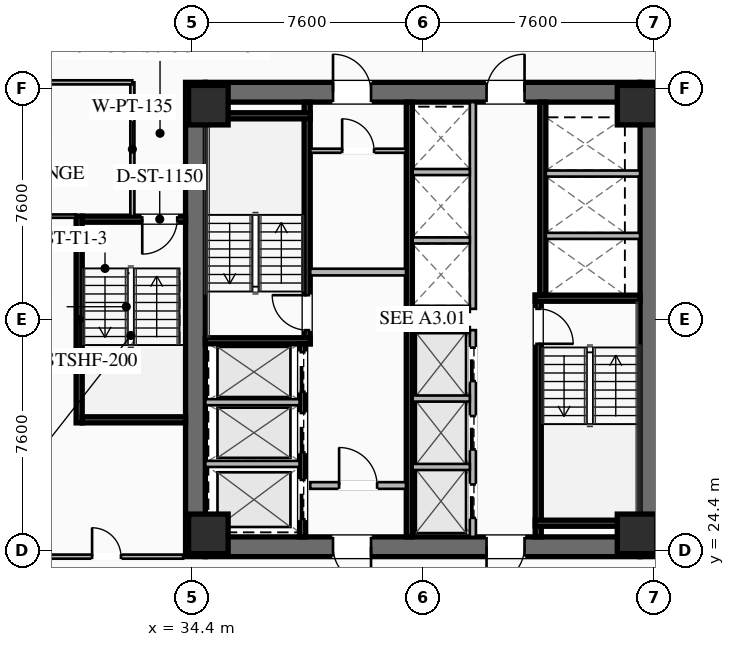
"""IFC4 building model, lengths in metres.
Left out: names, types, materials, properties, quantities, classifications, styles, units other than length and angle.
Written with IfcOpenShell. Run it as: python <this file> out.ifc"""

import sys

from ifc_helpers import new_model, si_unit, direction, frame, frame_2d, origin, origin_2d, place, context, subcontext, project, spatial, rectangle, hollow_rectangle, extrude, element, fill, save


model = new_model("IFC4")
c1 = context("Model", 3, precision=1e-05, world=origin(), true_north=direction((0.0, 1.0)))
c2 = subcontext(c1, "Body", "Model", "MODEL_VIEW")
j1 = project(units=[si_unit("LENGTHUNIT", "METRE"), si_unit("PLANEANGLEUNIT", "RADIAN")], contexts=[c1])
p1 = place(None, origin())
s1 = spatial("IfcSite", under=j1, at=p1, CompositionType="ELEMENT")
p2 = place(p1, origin())
s2 = spatial("IfcBuilding", under=s1, at=p2, CompositionType="ELEMENT")
p3 = place(p2, frame((0.0, 0.0, 92.05)))
s3 = spatial("IfcBuildingStorey", under=s2, at=p3, CompositionType="ELEMENT", Elevation=92.05)
for number, where, z_axis, x_axis in (
    (1, (34.525, 24.2, 0.0), (0.0, 0.0, 1.0), (0.0, 1.0, 0.0)),
    (2, (49.475, 39.8, 0.0), (0.0, 0.0, 1.0), (0.0, -1.0, 0.0)),
):
    element("IfcWall", number, at=place(p3, frame(where, z_axis=z_axis, x_axis=x_axis)), inside=s3, PredefinedType="SHEAR", context=c2, shape_type="SweptSolid", body=[
        extrude(rectangle(XDim=15.6, YDim=0.65, at=frame_2d((7.8, 0.0))), origin(), (0.0, 0.0, 1.0), 3.55),
    ])
p4 = place(p3, frame((49.15, 24.525, 0.0), z_axis=(0.0, 0.0, 1.0), x_axis=(-1.0, 0.0, 0.0)))
e3 = element("IfcWall", 3, at=p4, inside=s3, PredefinedType="SHEAR", context=c2, shape_type="SweptSolid", body=[
    extrude(rectangle(XDim=14.3, YDim=0.65, at=frame_2d((7.15, 0.0))), origin(), (0.0, 0.0, 1.0), 3.55),
])
p5 = place(p4, frame((8.85, 0.0, 0.0)))
e4 = element("IfcOpeningElement", 4, at=p5, cuts=e3, PredefinedType="OPENING", context=c2, shape_type="SweptSolid", body=[
    extrude(rectangle(XDim=1.25, YDim=2.25, at=frame_2d((0.625, 1.125))), frame((0.0, 0.335, 0.0), z_axis=(0.0, -1.0, 0.0), x_axis=(1.0, 0.0, 0.0)), (0.0, 0.0, 1.0), 0.67),
])
p6 = place(p4, frame((3.8, 0.0, 0.0)))
e5 = element("IfcOpeningElement", 5, at=p6, cuts=e3, PredefinedType="OPENING", context=c2, shape_type="SweptSolid", body=[
    extrude(rectangle(XDim=1.25, YDim=2.25, at=frame_2d((0.625, 1.125))), frame((0.0, 0.335, 0.0), z_axis=(0.0, -1.0, 0.0), x_axis=(1.0, 0.0, 0.0)), (0.0, 0.0, 1.0), 0.67),
])
p7 = place(p3, frame((34.85, 39.475, 0.0), z_axis=(0.0, 0.0, 1.0), x_axis=(1.0, 0.0, 0.0)))
e6 = element("IfcWall", 6, at=p7, inside=s3, PredefinedType="SHEAR", context=c2, shape_type="SweptSolid", body=[
    extrude(rectangle(XDim=14.3, YDim=0.65, at=frame_2d((7.15, 0.0))), origin(), (0.0, 0.0, 1.0), 3.55),
])
p8 = place(p7, frame((4.2, 0.0, 0.0)))
e7 = element("IfcOpeningElement", 7, at=p8, cuts=e6, PredefinedType="OPENING", context=c2, shape_type="SweptSolid", body=[
    extrude(rectangle(XDim=1.25, YDim=2.25, at=frame_2d((0.625, 1.125))), frame((0.0, 0.335, 0.0), z_axis=(0.0, -1.0, 0.0), x_axis=(1.0, 0.0, 0.0)), (0.0, 0.0, 1.0), 0.67),
])
p9 = place(p7, frame((9.25, 0.0, 0.0)))
e8 = element("IfcOpeningElement", 8, at=p9, cuts=e6, PredefinedType="OPENING", context=c2, shape_type="SweptSolid", body=[
    extrude(rectangle(XDim=1.25, YDim=2.25, at=frame_2d((0.625, 1.125))), frame((0.0, 0.335, 0.0), z_axis=(0.0, -1.0, 0.0), x_axis=(1.0, 0.0, 0.0)), (0.0, 0.0, 1.0), 0.67),
])
for number, where, z_axis, x_axis in (
    (9, (34.95, 24.95, 0.0), (0.0, 0.0, 1.0), (1.0, 0.0, 0.0)),
    (10, (49.05, 24.95, 0.0), (0.0, 0.0, 1.0), (1.0, 0.0, 0.0)),
    (11, (49.05, 39.05, 0.0), (0.0, 0.0, 1.0), (1.0, 0.0, 0.0)),
    (12, (34.95, 39.05, 0.0), (0.0, 0.0, 1.0), (1.0, 0.0, 0.0)),
):
    element("IfcColumn", number, at=place(p3, frame(where, z_axis=z_axis, x_axis=x_axis)), inside=s3, PredefinedType="COLUMN", context=c2, shape_type="SweptSolid", body=[
        extrude(hollow_rectangle(XDim=1.3, YDim=1.3, WallThickness=0.05, at=origin_2d()), origin(), (0.0, 0.0, 1.0), 3.35),
    ])
p10 = place(p3, frame((38.2, 31.2, 0.0), z_axis=(0.0, 0.0, 1.0), x_axis=(0.0, 1.0, 0.0)))
e13 = element("IfcWall", 13, at=p10, inside=s3, PredefinedType="SHEAR", context=c2, shape_type="SweptSolid", body=[
    extrude(rectangle(XDim=7.95, YDim=0.2, at=frame_2d((3.975, 0.0))), origin(), (0.0, 0.0, 1.0), 3.35),
])
p11 = place(p10, frame((0.45, 0.0, 0.0)))
e14 = element("IfcOpeningElement", 14, at=p11, cuts=e13, PredefinedType="OPENING", context=c2, shape_type="SweptSolid", body=[
    extrude(rectangle(XDim=1.15, YDim=2.2, at=frame_2d((0.575, 1.1))), frame((0.0, 0.11, 0.0), z_axis=(0.0, -1.0, 0.0), x_axis=(1.0, 0.0, 0.0)), (0.0, 0.0, 1.0), 0.22),
])
for number, where, z_axis, x_axis in (
    (15, (34.85, 31.3, 0.0), (0.0, 0.0, 1.0), (1.0, 0.0, 0.0)),
    (16, (34.85, 38.7, 0.0), (0.0, 0.0, 1.0), (1.0, 0.0, 0.0)),
):
    element("IfcWall", number, at=place(p3, frame(where, z_axis=z_axis, x_axis=x_axis)), inside=s3, PredefinedType="SHEAR", context=c2, shape_type="SweptSolid", body=[
        extrude(rectangle(XDim=3.45, YDim=0.2, at=frame_2d((1.725, 0.0))), origin(), (0.0, 0.0, 1.0), 3.35),
    ])
p12 = place(p3, frame((45.8, 32.8, 0.0), z_axis=(0.0, 0.0, 1.0), x_axis=(0.0, -1.0, 0.0)))
e17 = element("IfcWall", 17, at=p12, inside=s3, PredefinedType="SHEAR", context=c2, shape_type="SweptSolid", body=[
    extrude(rectangle(XDim=7.95, YDim=0.2, at=frame_2d((3.975, 0.0))), origin(), (0.0, 0.0, 1.0), 3.35),
])
p13 = place(p12, frame((0.45, 0.0, 0.0)))
e18 = element("IfcOpeningElement", 18, at=p13, cuts=e17, PredefinedType="OPENING", context=c2, shape_type="SweptSolid", body=[
    extrude(rectangle(XDim=1.15, YDim=2.2, at=frame_2d((0.575, 1.1))), frame((0.0, 0.11, 0.0), z_axis=(0.0, -1.0, 0.0), x_axis=(1.0, 0.0, 0.0)), (0.0, 0.0, 1.0), 0.22),
])
for number, where, z_axis, x_axis in (
    (19, (45.7, 32.7, 0.0), (0.0, 0.0, 1.0), (1.0, 0.0, 0.0)),
    (20, (45.7, 25.3, 0.0), (0.0, 0.0, 1.0), (1.0, 0.0, 0.0)),
):
    element("IfcWall", number, at=place(p3, frame(where, z_axis=z_axis, x_axis=x_axis)), inside=s3, PredefinedType="SHEAR", context=c2, shape_type="SweptSolid", body=[
        extrude(rectangle(XDim=3.45, YDim=0.2, at=frame_2d((1.725, 0.0))), origin(), (0.0, 0.0, 1.0), 3.35),
    ])
p14 = place(p3, frame((41.56, 24.85, 0.0), z_axis=(0.0, 0.0, 1.0), x_axis=(0.0, 1.0, 0.0)))
e21 = element("IfcWall", 21, at=p14, inside=s3, PredefinedType="SHEAR", context=c2, shape_type="SweptSolid", body=[
    extrude(rectangle(XDim=14.3, YDim=0.2, at=frame_2d((7.15, 0.0))), origin(), (0.0, 0.0, 1.0), 3.35),
])
p15 = place(p3, frame((38.3, 33.56, 0.0), z_axis=(0.0, 0.0, 1.0), x_axis=(1.0, 0.0, 0.0)))
e22 = element("IfcWall", 22, at=p15, inside=s3, PredefinedType="SOLIDWALL", context=c2, shape_type="SweptSolid", body=[
    extrude(rectangle(XDim=3.15, YDim=0.22, at=frame_2d((1.575, 0.0))), origin(), (0.0, 0.0, 1.0), 2.703),
])
p16 = place(p3, frame((38.3, 26.54, 0.0), z_axis=(0.0, 0.0, 1.0), x_axis=(1.0, 0.0, 0.0)))
e23 = element("IfcWall", 23, at=p16, inside=s3, PredefinedType="SOLIDWALL", context=c2, shape_type="SweptSolid", body=[
    extrude(rectangle(XDim=3.15, YDim=0.22, at=frame_2d((1.575, 0.0))), origin(), (0.0, 0.0, 1.0), 2.703),
])
p17 = place(p16, frame((0.95, 0.0, 0.0)))
e24 = element("IfcOpeningElement", 24, at=p17, cuts=e23, PredefinedType="OPENING", context=c2, shape_type="SweptSolid", body=[
    extrude(rectangle(XDim=1.25, YDim=2.25, at=frame_2d((0.625, 1.125))), frame((0.0, 0.12, 0.0), z_axis=(0.0, -1.0, 0.0), x_axis=(1.0, 0.0, 0.0)), (0.0, 0.0, 1.0), 0.24),
])
p18 = place(p3, frame((38.05, 24.85, 0.0), z_axis=(0.0, 0.0, 1.0), x_axis=(0.0, 1.0, 0.0)))
e25 = element("IfcWall", 25, at=p18, inside=s3, PredefinedType="SHEAR", context=c2, shape_type="SweptSolid", body=[
    extrude(rectangle(XDim=6.35, YDim=0.2, at=frame_2d((3.175, 0.0))), origin(), (0.0, 0.0, 1.0), 3.35),
])
p19 = place(p18, frame((4.775, 0.0, 0.0)))
e26 = element("IfcOpeningElement", 26, at=p19, cuts=e25, PredefinedType="OPENING", context=c2, shape_type="SweptSolid", body=[
    extrude(rectangle(XDim=1.3, YDim=2.25, at=frame_2d((0.65, 1.125))), frame((0.0, 0.11, 0.0), z_axis=(0.0, -1.0, 0.0), x_axis=(1.0, 0.0, 0.0)), (0.0, 0.0, 1.0), 0.22),
])
p20 = place(p18, frame((2.775, 0.0, 0.0)))
e27 = element("IfcOpeningElement", 27, at=p20, cuts=e25, PredefinedType="OPENING", context=c2, shape_type="SweptSolid", body=[
    extrude(rectangle(XDim=1.3, YDim=2.25, at=frame_2d((0.65, 1.125))), frame((0.0, 0.11, 0.0), z_axis=(0.0, -1.0, 0.0), x_axis=(1.0, 0.0, 0.0)), (0.0, 0.0, 1.0), 0.22),
])
p21 = place(p18, frame((0.575, 0.0, 0.0)))
e28 = element("IfcOpeningElement", 28, at=p21, cuts=e25, PredefinedType="OPENING", context=c2, shape_type="SweptSolid", body=[
    extrude(rectangle(XDim=1.3, YDim=2.25, at=frame_2d((0.65, 1.125))), frame((0.0, 0.11, 0.0), z_axis=(0.0, -1.0, 0.0), x_axis=(1.0, 0.0, 0.0)), (0.0, 0.0, 1.0), 0.22),
])
for number, where, z_axis, x_axis in (
    (29, (34.85, 27.25, 0.0), (0.0, 0.0, 1.0), (1.0, 0.0, 0.0)),
    (30, (34.85, 29.28, 0.0), (0.0, 0.0, 1.0), (1.0, 0.0, 0.0)),
):
    element("IfcWall", number, at=place(p3, frame(where, z_axis=z_axis, x_axis=x_axis)), inside=s3, PredefinedType="SOLIDWALL", context=c2, shape_type="SweptSolid", body=[
        extrude(rectangle(XDim=3.1, YDim=0.2, at=frame_2d((1.55, 0.0))), origin(), (0.0, 0.0, 1.0), 3.35),
    ])
p22 = place(p3, frame((45.95, 39.15, 0.0), z_axis=(0.0, 0.0, 1.0), x_axis=(0.0, -1.0, 0.0)))
e31 = element("IfcWall", 31, at=p22, inside=s3, PredefinedType="SHEAR", context=c2, shape_type="SweptSolid", body=[
    extrude(rectangle(XDim=6.35, YDim=0.2, at=frame_2d((3.175, 0.0))), origin(), (0.0, 0.0, 1.0), 3.35),
])
for number, where, z_axis, x_axis in (
    (32, (46.05, 34.75, 0.0), (0.0, 0.0, 1.0), (1.0, 0.0, 0.0)),
    (33, (46.05, 36.8, 0.0), (0.0, 0.0, 1.0), (1.0, 0.0, 0.0)),
):
    element("IfcWall", number, at=place(p3, frame(where, z_axis=z_axis, x_axis=x_axis)), inside=s3, PredefinedType="SOLIDWALL", context=c2, shape_type="SweptSolid", body=[
        extrude(rectangle(XDim=3.1, YDim=0.2, at=frame_2d((1.55, 0.0))), origin(), (0.0, 0.0, 1.0), 3.35),
    ])
p23 = place(p3, frame((38.3, 37.55, 0.0), z_axis=(0.0, 0.0, 1.0), x_axis=(1.0, 0.0, 0.0)))
e34 = element("IfcWall", 34, at=p23, inside=s3, PredefinedType="PARTITIONING", context=c2, shape_type="SweptSolid", body=[
    extrude(rectangle(XDim=3.15, YDim=0.135, at=frame_2d((1.575, 0.0))), origin(), (0.0, 0.0, 1.0), 2.703),
])
p24 = place(p23, frame((1.05, 0.0, 0.0)))
e35 = element("IfcOpeningElement", 35, at=p24, cuts=e34, PredefinedType="OPENING", context=c2, shape_type="SweptSolid", body=[
    extrude(rectangle(XDim=1.05, YDim=2.2, at=frame_2d((0.525, 1.1))), frame((0.0, 0.077, 0.0), z_axis=(0.0, -1.0, 0.0), x_axis=(1.0, 0.0, 0.0)), (0.0, 0.0, 1.0), 0.155),
])
p25 = place(p3, frame((43.65, 24.85, 0.0), z_axis=(0.0, 0.0, 1.0), x_axis=(0.0, 1.0, 0.0)))
e36 = element("IfcWall", 36, at=p25, inside=s3, PredefinedType="SOLIDWALL", context=c2, shape_type="SweptSolid", body=[
    extrude(rectangle(XDim=6.8, YDim=0.2, at=frame_2d((3.4, 0.0))), origin(), (0.0, 0.0, 1.0), 3.35),
])
p26 = place(p25, frame((0.625, 0.0, 0.0)))
e37 = element("IfcOpeningElement", 37, at=p26, cuts=e36, PredefinedType="OPENING", context=c2, shape_type="SweptSolid", body=[
    extrude(rectangle(XDim=1.1, YDim=2.2, at=frame_2d((0.55, 1.1))), frame((0.0, 0.11, 0.0), z_axis=(0.0, -1.0, 0.0), x_axis=(1.0, 0.0, 0.0)), (0.0, 0.0, 1.0), 0.22),
])
p27 = place(p25, frame((2.875, 0.0, 0.0)))
e38 = element("IfcOpeningElement", 38, at=p27, cuts=e36, PredefinedType="OPENING", context=c2, shape_type="SweptSolid", body=[
    extrude(rectangle(XDim=1.1, YDim=2.2, at=frame_2d((0.55, 1.1))), frame((0.0, 0.11, 0.0), z_axis=(0.0, -1.0, 0.0), x_axis=(1.0, 0.0, 0.0)), (0.0, 0.0, 1.0), 0.22),
])
p28 = place(p25, frame((5.125, 0.0, 0.0)))
e39 = element("IfcOpeningElement", 39, at=p28, cuts=e36, PredefinedType="OPENING", context=c2, shape_type="SweptSolid", body=[
    extrude(rectangle(XDim=1.1, YDim=2.2, at=frame_2d((0.55, 1.1))), frame((0.0, 0.11, 0.0), z_axis=(0.0, -1.0, 0.0), x_axis=(1.0, 0.0, 0.0)), (0.0, 0.0, 1.0), 0.22),
])
for number, where, z_axis, x_axis in (
    (40, (41.67, 27.15, 0.0), (0.0, 0.0, 1.0), (1.0, 0.0, 0.0)),
    (41, (41.67, 29.4, 0.0), (0.0, 0.0, 1.0), (1.0, 0.0, 0.0)),
    (42, (41.67, 31.65, 0.0), (0.0, 0.0, 1.0), (1.0, 0.0, 0.0)),
):
    element("IfcWall", number, at=place(p3, frame(where, z_axis=z_axis, x_axis=x_axis)), inside=s3, PredefinedType="SOLIDWALL", context=c2, shape_type="SweptSolid", body=[
        extrude(rectangle(XDim=1.88, YDim=0.2, at=frame_2d((0.94, 0.0))), origin(), (0.0, 0.0, 1.0), 3.35),
    ])
p29 = place(p3, frame((43.65, 32.35, 0.0), z_axis=(0.0, 0.0, 1.0), x_axis=(0.0, 1.0, 0.0)))
e43 = element("IfcWall", 43, at=p29, inside=s3, PredefinedType="SOLIDWALL", context=c2, shape_type="SweptSolid", body=[
    extrude(rectangle(XDim=6.8, YDim=0.2, at=frame_2d((3.4, 0.0))), origin(), (0.0, 0.0, 1.0), 3.35),
])
for number, where, z_axis, x_axis in (
    (44, (41.67, 32.35, 0.0), (0.0, 0.0, 1.0), (1.0, 0.0, 0.0)),
    (45, (41.67, 34.6, 0.0), (0.0, 0.0, 1.0), (1.0, 0.0, 0.0)),
    (46, (41.67, 36.85, 0.0), (0.0, 0.0, 1.0), (1.0, 0.0, 0.0)),
):
    element("IfcWall", number, at=place(p3, frame(where, z_axis=z_axis, x_axis=x_axis)), inside=s3, PredefinedType="SOLIDWALL", context=c2, shape_type="SweptSolid", body=[
        extrude(rectangle(XDim=1.88, YDim=0.2, at=frame_2d((0.94, 0.0))), origin(), (0.0, 0.0, 1.0), 3.35),
    ])
p30 = place(p3, frame((30.7, 28.6, 0.0), z_axis=(0.0, 0.0, 1.0), x_axis=(0.0, 1.0, 0.0)))
e47 = element("IfcWall", 47, at=p30, inside=s3, PredefinedType="SHEAR", context=c2, shape_type="SweptSolid", body=[
    extrude(rectangle(XDim=6.8, YDim=0.2, at=frame_2d((3.4, 0.0))), origin(), (0.0, 0.0, 1.0), 3.35),
])
p31 = place(p3, frame((34.2, 35.3, 0.0), z_axis=(0.0, 0.0, 1.0), x_axis=(-1.0, 0.0, 0.0)))
e48 = element("IfcWall", 48, at=p31, inside=s3, PredefinedType="SHEAR", context=c2, shape_type="SweptSolid", body=[
    extrude(rectangle(XDim=3.4, YDim=0.2, at=frame_2d((1.7, 0.0))), origin(), (0.0, 0.0, 1.0), 3.35),
])
p32 = place(p31, frame((0.275, 0.0, 0.0)))
e49 = element("IfcOpeningElement", 49, at=p32, cuts=e48, PredefinedType="OPENING", context=c2, shape_type="SweptSolid", body=[
    extrude(rectangle(XDim=1.15, YDim=2.2, at=frame_2d((0.575, 1.1))), frame((0.0, 0.11, 0.0), z_axis=(0.0, -1.0, 0.0), x_axis=(1.0, 0.0, 0.0)), (0.0, 0.0, 1.0), 0.22),
])
p33 = place(p3, frame((30.8, 28.7, 0.0), z_axis=(0.0, 0.0, 1.0), x_axis=(1.0, 0.0, 0.0)))
e50 = element("IfcWall", 50, at=p33, inside=s3, PredefinedType="SHEAR", context=c2, shape_type="SweptSolid", body=[
    extrude(rectangle(XDim=3.4, YDim=0.2, at=frame_2d((1.7, 0.0))), origin(), (0.0, 0.0, 1.0), 3.35),
])
p34 = place(p3, frame((32.45, 35.4, 0.0), z_axis=(0.0, 0.0, 1.0), x_axis=(0.0, 1.0, 0.0)))
e51 = element("IfcWall", 51, at=p34, inside=s3, PredefinedType="PARTITIONING", context=c2, shape_type="SweptSolid", body=[
    extrude(rectangle(XDim=4.4, YDim=0.135, at=frame_2d((2.2, 0.0))), origin(), (0.0, 0.0, 1.0), 2.703),
])
p35 = place(p3, frame((32.45, 39.8, 0.0), z_axis=(0.0, 0.0, 1.0), x_axis=(-1.0, 0.0, 0.0)))
e52 = element("IfcWall", 52, at=p35, inside=s3, PredefinedType="PARTITIONING", context=c2, shape_type="SweptSolid", body=[
    extrude(rectangle(XDim=11.43, YDim=0.135, at=frame_2d((5.715, 0.0))), origin(), (0.0, 0.0, 1.0), 2.703),
])
p36 = place(p35, frame((4.89, 0.0, 0.0)))
e53 = element("IfcOpeningElement", 53, at=p36, cuts=e52, PredefinedType="OPENING", context=c2, shape_type="SweptSolid", body=[
    extrude(rectangle(XDim=0.95, YDim=2.05, at=frame_2d((0.475, 1.025))), frame((0.0, 0.077, 0.0), z_axis=(0.0, -1.0, 0.0), x_axis=(1.0, 0.0, 0.0)), (0.0, 0.0, 1.0), 0.155),
])
p37 = place(p3, frame((21.02, 24.2, 0.0), z_axis=(0.0, 0.0, 1.0), x_axis=(1.0, 0.0, 0.0)))
e54 = element("IfcWall", 54, at=p37, inside=s3, PredefinedType="PARTITIONING", context=c2, shape_type="SweptSolid", body=[
    extrude(rectangle(XDim=13.1, YDim=0.135, at=frame_2d((6.55, 0.0))), origin(), (0.0, 0.0, 1.0), 2.703),
])
p38 = place(p37, frame((10.105, 0.0, 0.0)))
e55 = element("IfcOpeningElement", 55, at=p38, cuts=e54, PredefinedType="OPENING", context=c2, shape_type="SweptSolid", body=[
    extrude(rectangle(XDim=0.95, YDim=2.05, at=frame_2d((0.475, 1.025))), frame((0.0, 0.077, 0.0), z_axis=(0.0, -1.0, 0.0), x_axis=(1.0, 0.0, 0.0)), (0.0, 0.0, 1.0), 0.155),
])
p39 = place(p3, frame((30.6, 35.4, 0.0), z_axis=(0.0, 0.0, 1.0), x_axis=(-1.0, 0.0, 0.0)))
e56 = element("IfcWall", 56, at=p39, inside=s3, PredefinedType="PARTITIONING", context=c2, shape_type="SweptSolid", body=[
    extrude(rectangle(XDim=9.58, YDim=0.11, at=frame_2d((4.79, 0.0))), origin(), (0.0, 0.0, 1.0), 2.703),
])
p40 = place(p8, origin())
e57 = element("IfcDoor", 57, at=p40, inside=s3, OperationType="SINGLE_SWING_LEFT", PredefinedType="DOOR", context=c2, shape_type="SweptSolid", body=[
    extrude(rectangle(XDim=1.25, YDim=2.25, at=frame_2d((0.625, 1.125))), frame((0.0, 0.025, 0.0), z_axis=(0.0, -1.0, 0.0), x_axis=(1.0, 0.0, 0.0)), (0.0, 0.0, 1.0), 0.05),
])
fill(e7, e57)
p41 = place(p9, origin())
e58 = element("IfcDoor", 58, at=p41, inside=s3, OperationType="SINGLE_SWING_RIGHT", PredefinedType="DOOR", context=c2, shape_type="SweptSolid", body=[
    extrude(rectangle(XDim=1.25, YDim=2.25, at=frame_2d((0.625, 1.125))), frame((0.0, 0.025, 0.0), z_axis=(0.0, -1.0, 0.0), x_axis=(1.0, 0.0, 0.0)), (0.0, 0.0, 1.0), 0.05),
])
fill(e8, e58)
p42 = place(p5, origin())
e59 = element("IfcDoor", 59, at=p42, inside=s3, OperationType="SINGLE_SWING_LEFT", PredefinedType="DOOR", context=c2, shape_type="SweptSolid", body=[
    extrude(rectangle(XDim=1.25, YDim=2.25, at=frame_2d((0.625, 1.125))), frame((0.0, 0.025, 0.0), z_axis=(0.0, -1.0, 0.0), x_axis=(1.0, 0.0, 0.0)), (0.0, 0.0, 1.0), 0.05),
])
fill(e4, e59)
p43 = place(p6, origin())
e60 = element("IfcDoor", 60, at=p43, inside=s3, OperationType="SINGLE_SWING_RIGHT", PredefinedType="DOOR", context=c2, shape_type="SweptSolid", body=[
    extrude(rectangle(XDim=1.25, YDim=2.25, at=frame_2d((0.625, 1.125))), frame((0.0, 0.025, 0.0), z_axis=(0.0, -1.0, 0.0), x_axis=(1.0, 0.0, 0.0)), (0.0, 0.0, 1.0), 0.05),
])
fill(e5, e60)
p44 = place(p11, origin())
e61 = element("IfcDoor", 61, at=p44, inside=s3, OperationType="SINGLE_SWING_RIGHT", PredefinedType="DOOR", context=c2, shape_type="SweptSolid", body=[
    extrude(rectangle(XDim=1.15, YDim=2.2, at=frame_2d((0.575, 1.1))), frame((0.0, 0.025, 0.0), z_axis=(0.0, -1.0, 0.0), x_axis=(1.0, 0.0, 0.0)), (0.0, 0.0, 1.0), 0.05),
])
fill(e14, e61)
p45 = place(p13, origin())
e62 = element("IfcDoor", 62, at=p45, inside=s3, OperationType="SINGLE_SWING_RIGHT", PredefinedType="DOOR", context=c2, shape_type="SweptSolid", body=[
    extrude(rectangle(XDim=1.15, YDim=2.2, at=frame_2d((0.575, 1.1))), frame((0.0, 0.025, 0.0), z_axis=(0.0, -1.0, 0.0), x_axis=(1.0, 0.0, 0.0)), (0.0, 0.0, 1.0), 0.05),
])
fill(e18, e62)
p46 = place(p17, origin())
e63 = element("IfcDoor", 63, at=p46, inside=s3, OperationType="SINGLE_SWING_LEFT", PredefinedType="DOOR", context=c2, shape_type="SweptSolid", body=[
    extrude(rectangle(XDim=1.25, YDim=2.25, at=frame_2d((0.625, 1.125))), frame((0.0, 0.025, 0.0), z_axis=(0.0, -1.0, 0.0), x_axis=(1.0, 0.0, 0.0)), (0.0, 0.0, 1.0), 0.05),
])
fill(e24, e63)
p47 = place(p24, origin())
e64 = element("IfcDoor", 64, at=p47, inside=s3, OperationType="SINGLE_SWING_LEFT", PredefinedType="DOOR", context=c2, shape_type="SweptSolid", body=[
    extrude(rectangle(XDim=1.05, YDim=2.2, at=frame_2d((0.525, 1.1))), frame((0.0, 0.025, 0.0), z_axis=(0.0, -1.0, 0.0), x_axis=(1.0, 0.0, 0.0)), (0.0, 0.0, 1.0), 0.05),
])
fill(e35, e64)
p48 = place(p32, origin())
e65 = element("IfcDoor", 65, at=p48, inside=s3, OperationType="SINGLE_SWING_RIGHT", PredefinedType="DOOR", context=c2, shape_type="SweptSolid", body=[
    extrude(rectangle(XDim=1.15, YDim=2.2, at=frame_2d((0.575, 1.1))), frame((0.0, 0.025, 0.0), z_axis=(0.0, -1.0, 0.0), x_axis=(1.0, 0.0, 0.0)), (0.0, 0.0, 1.0), 0.05),
])
fill(e49, e65)
p49 = place(p38, origin())
e66 = element("IfcDoor", 66, at=p49, inside=s3, OperationType="SINGLE_SWING_LEFT", PredefinedType="DOOR", context=c2, shape_type="SweptSolid", body=[
    extrude(rectangle(XDim=0.95, YDim=2.05, at=frame_2d((0.475, 1.025))), frame((0.0, 0.025, 0.0), z_axis=(0.0, -1.0, 0.0), x_axis=(1.0, 0.0, 0.0)), (0.0, 0.0, 1.0), 0.05),
])
fill(e55, e66)
p50 = place(p19, origin())
e67 = element("IfcDoor", 67, at=p50, inside=s3, OperationType="SLIDING_TO_LEFT", PredefinedType="DOOR", context=c2, shape_type="SweptSolid", body=[
    extrude(rectangle(XDim=1.3, YDim=2.25, at=frame_2d((0.65, 1.125))), frame((0.0, 0.025, 0.0), z_axis=(0.0, -1.0, 0.0), x_axis=(1.0, 0.0, 0.0)), (0.0, 0.0, 1.0), 0.05),
])
fill(e26, e67)
p51 = place(p20, origin())
e68 = element("IfcDoor", 68, at=p51, inside=s3, OperationType="SLIDING_TO_LEFT", PredefinedType="DOOR", context=c2, shape_type="SweptSolid", body=[
    extrude(rectangle(XDim=1.3, YDim=2.25, at=frame_2d((0.65, 1.125))), frame((0.0, 0.025, 0.0), z_axis=(0.0, -1.0, 0.0), x_axis=(1.0, 0.0, 0.0)), (0.0, 0.0, 1.0), 0.05),
])
fill(e27, e68)
p52 = place(p21, origin())
e69 = element("IfcDoor", 69, at=p52, inside=s3, OperationType="SLIDING_TO_LEFT", PredefinedType="DOOR", context=c2, shape_type="SweptSolid", body=[
    extrude(rectangle(XDim=1.3, YDim=2.25, at=frame_2d((0.65, 1.125))), frame((0.0, 0.025, 0.0), z_axis=(0.0, -1.0, 0.0), x_axis=(1.0, 0.0, 0.0)), (0.0, 0.0, 1.0), 0.05),
])
fill(e28, e69)
p53 = place(p26, origin())
e70 = element("IfcDoor", 70, at=p53, inside=s3, OperationType="SLIDING_TO_LEFT", PredefinedType="DOOR", context=c2, shape_type="SweptSolid", body=[
    extrude(rectangle(XDim=1.1, YDim=2.2, at=frame_2d((0.55, 1.1))), frame((0.0, 0.025, 0.0), z_axis=(0.0, -1.0, 0.0), x_axis=(1.0, 0.0, 0.0)), (0.0, 0.0, 1.0), 0.05),
])
fill(e37, e70)
p54 = place(p27, origin())
e71 = element("IfcDoor", 71, at=p54, inside=s3, OperationType="SLIDING_TO_LEFT", PredefinedType="DOOR", context=c2, shape_type="SweptSolid", body=[
    extrude(rectangle(XDim=1.1, YDim=2.2, at=frame_2d((0.55, 1.1))), frame((0.0, 0.025, 0.0), z_axis=(0.0, -1.0, 0.0), x_axis=(1.0, 0.0, 0.0)), (0.0, 0.0, 1.0), 0.05),
])
fill(e38, e71)
p55 = place(p28, origin())
e72 = element("IfcDoor", 72, at=p55, inside=s3, OperationType="SLIDING_TO_LEFT", PredefinedType="DOOR", context=c2, shape_type="SweptSolid", body=[
    extrude(rectangle(XDim=1.1, YDim=2.2, at=frame_2d((0.55, 1.1))), frame((0.0, 0.025, 0.0), z_axis=(0.0, -1.0, 0.0), x_axis=(1.0, 0.0, 0.0)), (0.0, 0.0, 1.0), 0.05),
])
fill(e39, e72)
save(model, sys.argv[1])
